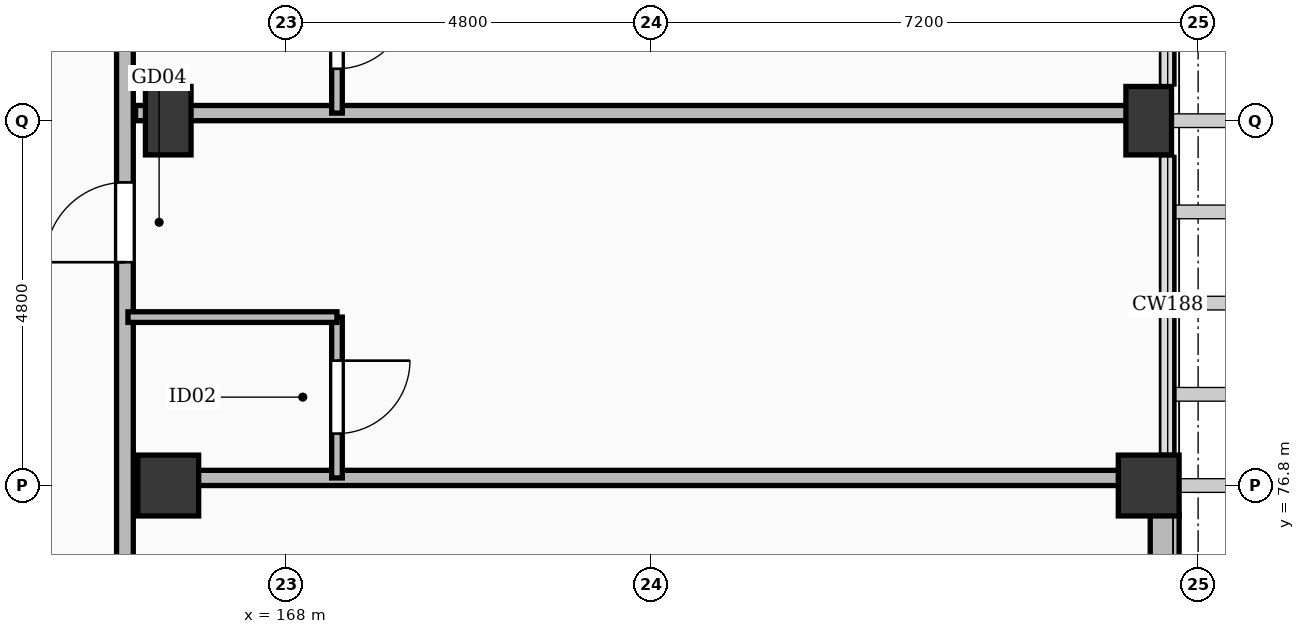
"""IFC4 building model, lengths in metres.
Left out: names, types, materials, properties, quantities, classifications, styles, units other than length and angle.
Written with IfcOpenShell. Run it as: python <this file> out.ifc"""

import sys

from ifc_helpers import new_model, si_unit, direction, frame, frame_2d, origin, origin_2d, place, context, subcontext, project, spatial, rectangle, extrude, element, fill, save


model = new_model("IFC4")
c1 = context("Model", 3, precision=1e-05, world=origin(), true_north=direction((0.0, 1.0)))
c2 = subcontext(c1, "Body", "Model", "MODEL_VIEW")
j1 = project(units=[si_unit("LENGTHUNIT", "METRE"), si_unit("PLANEANGLEUNIT", "RADIAN")], contexts=[c1])
p1 = place(None, origin())
s1 = spatial("IfcSite", under=j1, at=p1, CompositionType="ELEMENT")
p2 = place(p1, origin())
s2 = spatial("IfcBuilding", under=s1, at=p2, CompositionType="ELEMENT")
p3 = place(p2, frame((0.0, 0.0, 21.0)))
s3 = spatial("IfcBuildingStorey", under=s2, at=p3, CompositionType="ELEMENT", Elevation=21.0)
for number, where, z_axis, x_axis in (
    (1, (166.45, 76.8, 0.0), (0.0, 0.0, 1.0), (1.0, 0.0, 0.0)),
    (2, (179.35, 76.8, 0.0), (0.0, 0.0, 1.0), (1.0, 0.0, 0.0)),
):
    element("IfcColumn", number, at=place(p3, frame(where, z_axis=z_axis, x_axis=x_axis)), inside=s3, PredefinedType="COLUMN", context=c2, shape_type="SweptSolid", body=[
        extrude(rectangle(XDim=0.8, YDim=0.8, at=origin_2d()), origin(), (0.0, 0.0, 1.0), 3.6),
    ])
for number, where, z_axis, x_axis in (
    (3, (166.45, 81.6, -0.26), (0.0, 0.0, 1.0), (1.0, 0.0, 0.0)),
    (4, (179.35, 81.6, -0.26), (0.0, 0.0, 1.0), (1.0, 0.0, 0.0)),
):
    element("IfcColumn", number, at=place(p3, frame(where, z_axis=z_axis, x_axis=x_axis)), inside=s3, PredefinedType="COLUMN", context=c2, shape_type="SweptSolid", body=[
        extrude(rectangle(XDim=0.6, YDim=0.9, at=origin_2d()), origin(), (0.0, 0.0, 1.0), 3.86),
    ])
p4 = place(p3, frame((179.56, 76.425, 0.0), z_axis=(0.0, 0.0, 1.0), x_axis=(0.0, -1.0, 0.0)))
e5 = element("IfcWall", 5, at=p4, inside=s3, PredefinedType="SOLIDWALL", context=c2, shape_type="SweptSolid", body=[
    extrude(rectangle(XDim=4.0, YDim=0.38, at=frame_2d((2.0, 0.0))), origin(), (0.0, 0.0, 1.0), 2.582),
])
p5 = place(p4, frame((1.025, 0.0, 0.55)))
e6 = element("IfcOpeningElement", 6, at=p5, cuts=e5, PredefinedType="OPENING", context=c2, shape_type="SweptSolid", body=[
    extrude(rectangle(XDim=1.95, YDim=1.77, at=frame_2d((0.975, 0.885))), frame((0.0, 0.202, 0.0), z_axis=(0.0, -1.0, 0.0), x_axis=(1.0, 0.0, 0.0)), (0.0, 0.0, 1.0), 0.404),
])
p6 = place(p3, frame((165.88, 65.4, 0.0), z_axis=(0.0, 0.0, 1.0), x_axis=(0.0, 1.0, 0.0)))
e7 = element("IfcWall", 7, at=p6, inside=s3, PredefinedType="PARTITIONING", context=c2, shape_type="SweptSolid", body=[
    extrude(rectangle(XDim=60.25, YDim=0.22, at=frame_2d((30.125, 0.0))), origin(), (0.0, 0.0, 1.0), 2.582),
])
p7 = place(p6, frame((4.388, 0.0, 0.0)))
e8 = element("IfcOpeningElement", 8, at=p7, cuts=e7, PredefinedType="OPENING", context=c2, shape_type="SweptSolid", body=[
    extrude(rectangle(XDim=1.28, YDim=2.16, at=frame_2d((0.64, 1.08))), frame((0.0, 0.122, 0.0), z_axis=(0.0, -1.0, 0.0), x_axis=(1.0, 0.0, 0.0)), (0.0, 0.0, 1.0), 0.244),
])
p8 = place(p6, frame((9.538, 0.0, 0.0)))
e9 = element("IfcOpeningElement", 9, at=p8, cuts=e7, PredefinedType="OPENING", context=c2, shape_type="SweptSolid", body=[
    extrude(rectangle(XDim=0.9, YDim=2.08, at=frame_2d((0.45, 1.04))), frame((0.0, 0.122, 0.0), z_axis=(0.0, -1.0, 0.0), x_axis=(1.0, 0.0, 0.0)), (0.0, 0.0, 1.0), 0.244),
])
p9 = place(p6, frame((14.338, 0.0, 0.0)))
e10 = element("IfcOpeningElement", 10, at=p9, cuts=e7, PredefinedType="OPENING", context=c2, shape_type="SweptSolid", body=[
    extrude(rectangle(XDim=1.05, YDim=2.22, at=frame_2d((0.525, 1.11))), frame((0.0, 0.122, 0.0), z_axis=(0.0, -1.0, 0.0), x_axis=(1.0, 0.0, 0.0)), (0.0, 0.0, 1.0), 0.244),
])
p10 = place(p6, frame((19.138, 0.0, 0.0)))
e11 = element("IfcOpeningElement", 11, at=p10, cuts=e7, PredefinedType="OPENING", context=c2, shape_type="SweptSolid", body=[
    extrude(rectangle(XDim=1.02, YDim=2.2, at=frame_2d((0.51, 1.1))), frame((0.0, 0.122, 0.0), z_axis=(0.0, -1.0, 0.0), x_axis=(1.0, 0.0, 0.0)), (0.0, 0.0, 1.0), 0.244),
])
p11 = place(p6, frame((23.938, 0.0, 0.0)))
e12 = element("IfcOpeningElement", 12, at=p11, cuts=e7, PredefinedType="OPENING", context=c2, shape_type="SweptSolid", body=[
    extrude(rectangle(XDim=1.14, YDim=2.26, at=frame_2d((0.57, 1.13))), frame((0.0, 0.122, 0.0), z_axis=(0.0, -1.0, 0.0), x_axis=(1.0, 0.0, 0.0)), (0.0, 0.0, 1.0), 0.244),
])
p12 = place(p6, frame((28.738, 0.0, 0.0)))
e13 = element("IfcOpeningElement", 13, at=p12, cuts=e7, PredefinedType="OPENING", context=c2, shape_type="SweptSolid", body=[
    extrude(rectangle(XDim=0.98, YDim=2.15, at=frame_2d((0.49, 1.075))), frame((0.0, 0.122, 0.0), z_axis=(0.0, -1.0, 0.0), x_axis=(1.0, 0.0, 0.0)), (0.0, 0.0, 1.0), 0.244),
])
p13 = place(p6, frame((33.188, 0.0, 0.0)))
e14 = element("IfcOpeningElement", 14, at=p13, cuts=e7, PredefinedType="OPENING", context=c2, shape_type="SweptSolid", body=[
    extrude(rectangle(XDim=1.28, YDim=2.16, at=frame_2d((0.64, 1.08))), frame((0.0, 0.122, 0.0), z_axis=(0.0, -1.0, 0.0), x_axis=(1.0, 0.0, 0.0)), (0.0, 0.0, 1.0), 0.244),
])
p14 = place(p6, frame((38.338, 0.0, 0.0)))
e15 = element("IfcOpeningElement", 15, at=p14, cuts=e7, PredefinedType="OPENING", context=c2, shape_type="SweptSolid", body=[
    extrude(rectangle(XDim=0.9, YDim=2.08, at=frame_2d((0.45, 1.04))), frame((0.0, 0.122, 0.0), z_axis=(0.0, -1.0, 0.0), x_axis=(1.0, 0.0, 0.0)), (0.0, 0.0, 1.0), 0.244),
])
p15 = place(p6, frame((43.138, 0.0, 0.0)))
e16 = element("IfcOpeningElement", 16, at=p15, cuts=e7, PredefinedType="OPENING", context=c2, shape_type="SweptSolid", body=[
    extrude(rectangle(XDim=1.05, YDim=2.22, at=frame_2d((0.525, 1.11))), frame((0.0, 0.122, 0.0), z_axis=(0.0, -1.0, 0.0), x_axis=(1.0, 0.0, 0.0)), (0.0, 0.0, 1.0), 0.244),
])
p16 = place(p6, frame((47.938, 0.0, 0.0)))
e17 = element("IfcOpeningElement", 17, at=p16, cuts=e7, PredefinedType="OPENING", context=c2, shape_type="SweptSolid", body=[
    extrude(rectangle(XDim=1.02, YDim=2.2, at=frame_2d((0.51, 1.1))), frame((0.0, 0.122, 0.0), z_axis=(0.0, -1.0, 0.0), x_axis=(1.0, 0.0, 0.0)), (0.0, 0.0, 1.0), 0.244),
])
p17 = place(p6, frame((52.738, 0.0, 0.0)))
e18 = element("IfcOpeningElement", 18, at=p17, cuts=e7, PredefinedType="OPENING", context=c2, shape_type="SweptSolid", body=[
    extrude(rectangle(XDim=1.14, YDim=2.26, at=frame_2d((0.57, 1.13))), frame((0.0, 0.122, 0.0), z_axis=(0.0, -1.0, 0.0), x_axis=(1.0, 0.0, 0.0)), (0.0, 0.0, 1.0), 0.244),
])
p18 = place(p6, frame((57.538, 0.0, 0.0)))
e19 = element("IfcOpeningElement", 19, at=p18, cuts=e7, PredefinedType="OPENING", context=c2, shape_type="SweptSolid", body=[
    extrude(rectangle(XDim=0.98, YDim=2.15, at=frame_2d((0.49, 1.075))), frame((0.0, 0.122, 0.0), z_axis=(0.0, -1.0, 0.0), x_axis=(1.0, 0.0, 0.0)), (0.0, 0.0, 1.0), 0.244),
])
p19 = place(p3, frame((166.02, 76.9, 0.0), z_axis=(0.0, 0.0, 1.0), x_axis=(1.0, 0.0, 0.0)))
e20 = element("IfcWall", 20, at=p19, inside=s3, PredefinedType="PARTITIONING", context=c2, shape_type="SweptSolid", body=[
    extrude(rectangle(XDim=13.23, YDim=0.2, at=frame_2d((6.615, 0.0))), origin(), (0.0, 0.0, 1.0), 2.582),
])
p20 = place(p3, frame((168.67, 76.9, 0.0), z_axis=(0.0, 0.0, 1.0), x_axis=(0.0, 1.0, 0.0)))
e21 = element("IfcWall", 21, at=p20, inside=s3, PredefinedType="PARTITIONING", context=c2, shape_type="SweptSolid", body=[
    extrude(rectangle(XDim=2.116, YDim=0.14, at=frame_2d((1.058, 0.0))), origin(), (0.0, 0.0, 1.0), 2.652),
])
p21 = place(p20, frame((0.583, 0.0, 0.0)))
e22 = element("IfcOpeningElement", 22, at=p21, cuts=e21, PredefinedType="OPENING", context=c2, shape_type="SweptSolid", body=[
    extrude(rectangle(XDim=0.96, YDim=2.12, at=frame_2d((0.48, 1.06))), frame((0.0, 0.082, 0.0), z_axis=(0.0, -1.0, 0.0), x_axis=(1.0, 0.0, 0.0)), (0.0, 0.0, 1.0), 0.164),
])
p22 = place(p3, frame((165.92, 79.016, 0.0), z_axis=(0.0, 0.0, 1.0), x_axis=(1.0, 0.0, 0.0)))
e23 = element("IfcWall", 23, at=p22, inside=s3, PredefinedType="PARTITIONING", context=c2, shape_type="SweptSolid", body=[
    extrude(rectangle(XDim=2.75, YDim=0.14, at=frame_2d((1.375, 0.0))), origin(), (0.0, 0.0, 1.0), 2.652),
])
p23 = place(p3, frame((166.02, 81.7, 0.0), z_axis=(0.0, 0.0, 1.0), x_axis=(1.0, 0.0, 0.0)))
e24 = element("IfcWall", 24, at=p23, inside=s3, PredefinedType="PARTITIONING", context=c2, shape_type="SweptSolid", body=[
    extrude(rectangle(XDim=13.23, YDim=0.2, at=frame_2d((6.615, 0.0))), origin(), (0.0, 0.0, 1.0), 2.582),
])
p24 = place(p3, frame((168.67, 81.7, 0.0), z_axis=(0.0, 0.0, 1.0), x_axis=(0.0, 1.0, 0.0)))
e25 = element("IfcWall", 25, at=p24, inside=s3, PredefinedType="PARTITIONING", context=c2, shape_type="SweptSolid", body=[
    extrude(rectangle(XDim=2.116, YDim=0.14, at=frame_2d((1.058, 0.0))), origin(), (0.0, 0.0, 1.0), 2.652),
])
p25 = place(p24, frame((0.583, 0.0, 0.0)))
e26 = element("IfcOpeningElement", 26, at=p25, cuts=e25, PredefinedType="OPENING", context=c2, shape_type="SweptSolid", body=[
    extrude(rectangle(XDim=0.96, YDim=2.12, at=frame_2d((0.48, 1.06))), frame((0.0, 0.082, 0.0), z_axis=(0.0, -1.0, 0.0), x_axis=(1.0, 0.0, 0.0)), (0.0, 0.0, 1.0), 0.164),
])
p26 = place(p9, origin())
e27 = element("IfcDoor", 27, at=p26, inside=s3, OperationType="SINGLE_SWING_LEFT", PredefinedType="DOOR", context=c2, shape_type="SweptSolid", body=[
    extrude(rectangle(XDim=1.05, YDim=2.22, at=frame_2d((0.525, 1.11))), frame((0.0, 0.025, 0.0), z_axis=(0.0, -1.0, 0.0), x_axis=(1.0, 0.0, 0.0)), (0.0, 0.0, 1.0), 0.05),
])
fill(e10, e27)
p27 = place(p21, frame((0.96, 0.0, 0.0), z_axis=(0.0, 0.0, 1.0), x_axis=(-1.0, 0.0, 0.0)))
e28 = element("IfcDoor", 28, at=p27, inside=s3, OperationType="SINGLE_SWING_RIGHT", PredefinedType="DOOR", context=c2, shape_type="SweptSolid", body=[
    extrude(rectangle(XDim=0.96, YDim=2.12, at=frame_2d((0.48, 1.06))), frame((0.0, 0.025, 0.0), z_axis=(0.0, -1.0, 0.0), x_axis=(1.0, 0.0, 0.0)), (0.0, 0.0, 1.0), 0.05),
])
fill(e22, e28)
p28 = place(p25, frame((0.96, 0.0, 0.0), z_axis=(0.0, 0.0, 1.0), x_axis=(-1.0, 0.0, 0.0)))
e29 = element("IfcDoor", 29, at=p28, inside=s3, OperationType="SINGLE_SWING_RIGHT", PredefinedType="DOOR", context=c2, shape_type="SweptSolid", body=[
    extrude(rectangle(XDim=0.96, YDim=2.12, at=frame_2d((0.48, 1.06))), frame((0.0, 0.025, 0.0), z_axis=(0.0, -1.0, 0.0), x_axis=(1.0, 0.0, 0.0)), (0.0, 0.0, 1.0), 0.05),
])
fill(e26, e29)
save(model, sys.argv[1])
